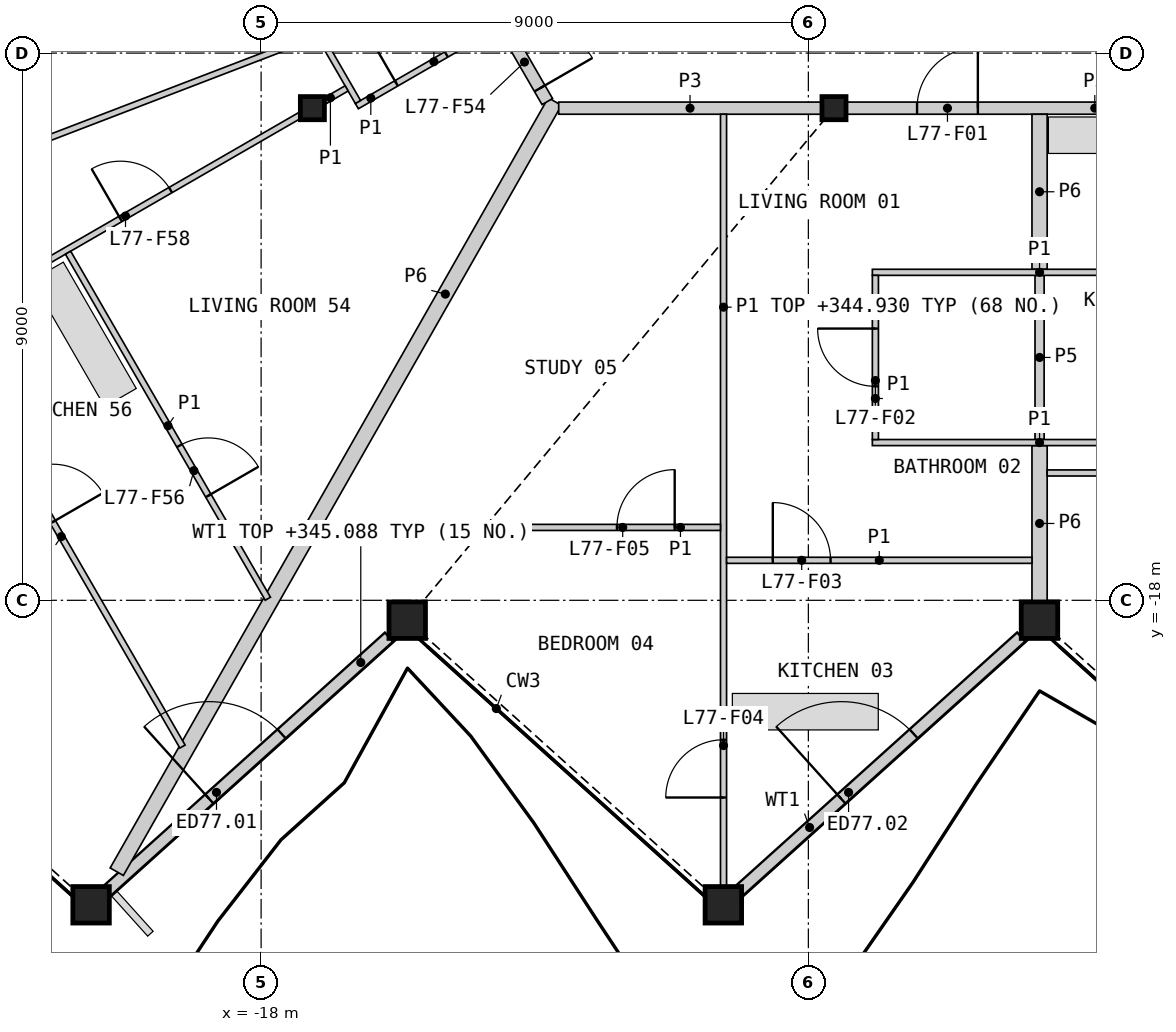
"""IFC4 building model, lengths in metres.
Left out: names, types, materials, properties, quantities, classifications, styles, units other than length and angle.
Written with IfcOpenShell. Run it as: python <this file> out.ifc"""

import sys

from ifc_helpers import new_model, si_unit, direction, frame, frame_2d, origin, origin_2d, place, context, subcontext, project, spatial, rectangle, hollow_rectangle, i_section, extrude, element, fill, save


model = new_model("IFC4")
c1 = context("Model", 3, precision=1e-05, world=origin(), true_north=direction((0.0, 1.0)))
c2 = subcontext(c1, "Body", "Model", "MODEL_VIEW")
j1 = project(units=[si_unit("LENGTHUNIT", "METRE"), si_unit("PLANEANGLEUNIT", "RADIAN")], contexts=[c1])
p1 = place(None, origin())
s1 = spatial("IfcSite", under=j1, at=p1, CompositionType="ELEMENT")
p2 = place(p1, origin())
s2 = spatial("IfcBuilding", under=s1, at=p2, CompositionType="ELEMENT")
p3 = place(p2, frame((0.0, 0.0, 342.6)))
s3 = spatial("IfcBuildingStorey", under=s2, at=p3, CompositionType="ELEMENT", Elevation=342.6)
for number, where, z_axis, x_axis in (
    (1, (-20.796, -23.008, 0.0), (0.0, 0.0, 1.0), (1.0, 0.0, 0.0)),
    (2, (-15.597, -18.327, 0.0), (0.0, 0.0, 1.0), (1.0, 0.0, 0.0)),
    (3, (-10.398, -23.008, 0.0), (0.0, 0.0, 1.0), (1.0, 0.0, 0.0)),
    (4, (-5.199, -18.327, 0.0), (0.0, 0.0, 1.0), (1.0, 0.0, 0.0)),
):
    element("IfcColumn", number, at=place(p3, frame(where, z_axis=z_axis, x_axis=x_axis)), inside=s3, PredefinedType="COLUMN", context=c2, shape_type="SweptSolid", body=[
        extrude(hollow_rectangle(XDim=0.6, YDim=0.6, WallThickness=0.04, at=origin_2d()), origin(), (0.0, 0.0, 1.0), 3.4),
    ])
for number, where, z_axis, x_axis in (
    (5, (-17.157, -9.906, 0.0), (0.0, 0.0, 1.0), (1.0, 0.0, 0.0)),
    (6, (-8.578, -9.906, 0.0), (0.0, 0.0, 1.0), (1.0, 0.0, 0.0)),
):
    element("IfcColumn", number, at=place(p3, frame(where, z_axis=z_axis, x_axis=x_axis)), inside=s3, PredefinedType="COLUMN", context=c2, shape_type="SweptSolid", body=[
        extrude(i_section(OverallWidth=0.396, OverallDepth=0.381, WebThickness=0.019, FlangeThickness=0.03, at=origin_2d()), origin(), (0.0, 0.0, 1.0), 3.4),
    ])
p4 = place(p3, frame((-20.534, -22.781, 0.0), z_axis=(0.0, 0.0, 1.0), x_axis=(0.743130709041, 0.669146283917, 0.0)))
e7 = element("IfcWall", 7, at=p4, inside=s3, PredefinedType="SOLIDWALL", context=c2, shape_type="SweptSolid", body=[
    extrude(rectangle(XDim=6.24, YDim=0.2, at=frame_2d((3.12, 0.0))), origin(), (0.0, 0.0, 1.0), 2.488),
])
p5 = place(p4, frame((2.263, 0.0, 0.0)))
e8 = element("IfcOpeningElement", 8, at=p5, cuts=e7, PredefinedType="OPENING", context=c2, shape_type="SweptSolid", body=[
    extrude(rectangle(XDim=1.6, YDim=2.25, at=frame_2d((0.8, 1.125))), frame((0.0, 0.11, 0.0), z_axis=(0.0, -1.0, 0.0), x_axis=(1.0, 0.0, 0.0)), (0.0, 0.0, 1.0), 0.22),
])
p6 = place(p3, frame((-10.139, -22.781, 0.0), z_axis=(0.0, 0.0, 1.0), x_axis=(0.743144430218, 0.669131045339, 0.0)))
e9 = element("IfcWall", 9, at=p6, inside=s3, PredefinedType="SOLIDWALL", context=c2, shape_type="SweptSolid", body=[
    extrude(rectangle(XDim=6.244, YDim=0.2, at=frame_2d((3.122, 0.0))), origin(), (0.0, 0.0, 1.0), 2.488),
])
p7 = place(p6, frame((2.263, 0.0, 0.0)))
e10 = element("IfcOpeningElement", 10, at=p7, cuts=e9, PredefinedType="OPENING", context=c2, shape_type="SweptSolid", body=[
    extrude(rectangle(XDim=1.6, YDim=2.25, at=frame_2d((0.8, 1.125))), frame((0.0, 0.11, 0.0), z_axis=(0.0, -1.0, 0.0), x_axis=(1.0, 0.0, 0.0)), (0.0, 0.0, 1.0), 0.22),
])
p8 = place(p3, frame((-20.374, -22.464, 0.0), z_axis=(0.0, 0.0, 1.0), x_axis=(0.494420378154, 0.869222922884, 0.0)))
e11 = element("IfcWall", 11, at=p8, inside=s3, PredefinedType="PARTITIONING", context=c2, shape_type="SweptSolid", body=[
    extrude(rectangle(XDim=14.573, YDim=0.25, at=frame_2d((7.286, 0.0))), origin(), (0.0, 0.0, 1.0), 2.33),
])
p9 = place(p3, frame((-8.371, -9.906, 0.0), z_axis=(0.0, 0.0, 1.0), x_axis=(1.0, 0.0, 0.0)))
e12 = element("IfcWall", 12, at=p9, inside=s3, PredefinedType="PARTITIONING", context=c2, shape_type="SweptSolid", body=[
    extrude(rectangle(XDim=8.163, YDim=0.2, at=frame_2d((4.082, 0.0))), origin(), (0.0, 0.0, 1.0), 3.1),
])
p10 = place(p9, frame((1.159, 0.0, 0.0)))
e13 = element("IfcOpeningElement", 13, at=p10, cuts=e12, PredefinedType="OPENING", context=c2, shape_type="SweptSolid", body=[
    extrude(rectangle(XDim=1.0, YDim=2.1, at=frame_2d((0.5, 1.05))), frame((0.0, 0.11, 0.0), z_axis=(0.0, -1.0, 0.0), x_axis=(1.0, 0.0, 0.0)), (0.0, 0.0, 1.0), 0.22),
])
p11 = place(p9, frame((6.327, 0.0, 0.0)))
e14 = element("IfcOpeningElement", 14, at=p11, cuts=e12, PredefinedType="OPENING", context=c2, shape_type="SweptSolid", body=[
    extrude(rectangle(XDim=1.0, YDim=2.1, at=frame_2d((0.5, 1.05))), frame((0.0, 0.11, 0.0), z_axis=(0.0, -1.0, 0.0), x_axis=(1.0, 0.0, 0.0)), (0.0, 0.0, 1.0), 0.22),
])
p12 = place(p3, frame((-13.106, -9.906, 0.0), z_axis=(0.0, 0.0, 1.0), x_axis=(1.0, 0.0, 0.0)))
e15 = element("IfcWall", 15, at=p12, inside=s3, PredefinedType="PARTITIONING", context=c2, shape_type="SweptSolid", body=[
    extrude(rectangle(XDim=4.32, YDim=0.2, at=frame_2d((2.16, 0.0))), origin(), (0.0, 0.0, 1.0), 3.1),
])
p13 = place(p3, frame((-15.131, -6.614, 0.0), z_axis=(0.0, 0.0, 1.0), x_axis=(0.499967746641, -0.866044024469, 0.0)))
e16 = element("IfcWall", 16, at=p13, inside=s3, PredefinedType="PARTITIONING", context=c2, shape_type="SweptSolid", body=[
    extrude(rectangle(XDim=3.676, YDim=0.2, at=frame_2d((1.838, 0.0))), origin(), (0.0, 0.0, 1.0), 3.1),
])
p14 = place(p13, frame((2.426, 0.0, 0.0)))
e17 = element("IfcOpeningElement", 17, at=p14, cuts=e16, PredefinedType="OPENING", context=c2, shape_type="SweptSolid", body=[
    extrude(rectangle(XDim=1.0, YDim=2.1, at=frame_2d((0.5, 1.05))), frame((0.0, 0.11, 0.0), z_axis=(0.0, -1.0, 0.0), x_axis=(1.0, 0.0, 0.0)), (0.0, 0.0, 1.0), 0.22),
])
p15 = place(p3, frame((-5.198, -12.556, 0.0), z_axis=(0.0, 0.0, 1.0), x_axis=(0.0, 1.0, 0.0)))
e18 = element("IfcWall", 18, at=p15, inside=s3, PredefinedType="PARTITIONING", context=c2, shape_type="SweptSolid", body=[
    extrude(rectangle(XDim=2.55, YDim=0.25, at=frame_2d((1.275, 0.0))), origin(), (0.0, 0.0, 1.0), 2.33),
])
p16 = place(p3, frame((-5.198, -18.017, 0.0), z_axis=(0.0, 0.0, 1.0), x_axis=(0.0, 1.0, 0.0)))
e19 = element("IfcWall", 19, at=p16, inside=s3, PredefinedType="PARTITIONING", context=c2, shape_type="SweptSolid", body=[
    extrude(rectangle(XDim=2.561, YDim=0.25, at=frame_2d((1.281, 0.0))), origin(), (0.0, 0.0, 1.0), 2.33),
])
p17 = place(p3, frame((-5.198, -15.356, 0.0), z_axis=(0.0, 0.0, 1.0), x_axis=(0.0, 1.0, 0.0)))
e20 = element("IfcWall", 20, at=p17, inside=s3, PredefinedType="PLUMBINGWALL", context=c2, shape_type="SweptSolid", body=[
    extrude(rectangle(XDim=2.7, YDim=0.15, at=frame_2d((1.35, 0.0))), origin(), (0.0, 0.0, 1.0), 2.33),
])
p18 = place(p3, frame((-10.395, -22.698, 0.0), z_axis=(0.0, 0.0, 1.0), x_axis=(0.0, 1.0, 0.0)))
e21 = element("IfcWall", 21, at=p18, inside=s3, PredefinedType="PARTITIONING", context=c2, shape_type="SweptSolid", body=[
    extrude(rectangle(XDim=12.692, YDim=0.1, at=frame_2d((6.346, 0.0))), origin(), (0.0, 0.0, 1.0), 2.33),
])
p19 = place(p18, frame((1.455, 0.0, 0.0)))
e22 = element("IfcOpeningElement", 22, at=p19, cuts=e21, PredefinedType="OPENING", context=c2, shape_type="SweptSolid", body=[
    extrude(rectangle(XDim=0.95, YDim=2.1, at=frame_2d((0.475, 1.05))), frame((0.0, 0.06, 0.0), z_axis=(0.0, -1.0, 0.0), x_axis=(1.0, 0.0, 0.0)), (0.0, 0.0, 1.0), 0.12),
])
p20 = place(p3, frame((-28.559, -13.11, 0.0), z_axis=(0.0, 0.0, 1.0), x_axis=(0.933581651686, 0.358364757802, 0.0)))
e23 = element("IfcWall", 23, at=p20, inside=s3, PredefinedType="PARTITIONING", context=c2, shape_type="SweptSolid", body=[
    extrude(rectangle(XDim=12.278, YDim=0.1, at=frame_2d((6.139, 0.0))), origin(), (0.0, 0.0, 1.0), 2.33),
])
p21 = place(p20, frame((5.564, 0.0, 0.0)))
e24 = element("IfcOpeningElement", 24, at=p21, cuts=e23, PredefinedType="OPENING", context=c2, shape_type="SweptSolid", body=[
    extrude(rectangle(XDim=0.95, YDim=2.1, at=frame_2d((0.475, 1.05))), frame((0.0, 0.06, 0.0), z_axis=(0.0, -1.0, 0.0), x_axis=(1.0, 0.0, 0.0)), (0.0, 0.0, 1.0), 0.12),
])
p22 = place(p3, frame((-27.122, -15.659, 0.0), z_axis=(0.0, 0.0, 1.0), x_axis=(0.866021046153, 0.500007547564, 0.0)))
e25 = element("IfcWall", 25, at=p22, inside=s3, PredefinedType="PARTITIONING", context=c2, shape_type="SweptSolid", body=[
    extrude(rectangle(XDim=11.267, YDim=0.1, at=frame_2d((5.634, 0.0))), origin(), (0.0, 0.0, 1.0), 2.33),
])
p23 = place(p22, frame((7.863, 0.0, 0.0)))
e26 = element("IfcOpeningElement", 26, at=p23, cuts=e25, PredefinedType="OPENING", context=c2, shape_type="SweptSolid", body=[
    extrude(rectangle(XDim=0.95, YDim=2.1, at=frame_2d((0.475, 1.05))), frame((0.0, 0.06, 0.0), z_axis=(0.0, -1.0, 0.0), x_axis=(1.0, 0.0, 0.0)), (0.0, 0.0, 1.0), 0.12),
])
p24 = place(p3, frame((-23.281, -13.499, 0.0), z_axis=(0.0, 0.0, 1.0), x_axis=(0.499994510044, -0.866028573389, 0.0)))
e27 = element("IfcWall", 27, at=p24, inside=s3, PredefinedType="PARTITIONING", context=c2, shape_type="SweptSolid", body=[
    extrude(rectangle(XDim=7.975, YDim=0.1, at=frame_2d((3.988, 0.0))), origin(), (0.0, 0.0, 1.0), 2.33),
])
p25 = place(p24, frame((2.76, 0.0, 0.0)))
e28 = element("IfcOpeningElement", 28, at=p25, cuts=e27, PredefinedType="OPENING", context=c2, shape_type="SweptSolid", body=[
    extrude(rectangle(XDim=0.95, YDim=2.1, at=frame_2d((0.475, 1.05))), frame((0.0, 0.06, 0.0), z_axis=(0.0, -1.0, 0.0), x_axis=(1.0, 0.0, 0.0)), (0.0, 0.0, 1.0), 0.12),
])
p26 = place(p3, frame((-17.028, -16.801, 0.0), z_axis=(0.0, 0.0, 1.0), x_axis=(1.0, 0.0, 0.0)))
e29 = element("IfcWall", 29, at=p26, inside=s3, PredefinedType="PARTITIONING", context=c2, shape_type="SweptSolid", body=[
    extrude(rectangle(XDim=6.583, YDim=0.1, at=frame_2d((3.292, 0.0))), origin(), (0.0, 0.0, 1.0), 2.33),
])
p27 = place(p26, frame((4.88, 0.0, 0.0)))
e30 = element("IfcOpeningElement", 30, at=p27, cuts=e29, PredefinedType="OPENING", context=c2, shape_type="SweptSolid", body=[
    extrude(rectangle(XDim=0.95, YDim=2.1, at=frame_2d((0.475, 1.05))), frame((0.0, 0.06, 0.0), z_axis=(0.0, -1.0, 0.0), x_axis=(1.0, 0.0, 0.0)), (0.0, 0.0, 1.0), 0.12),
])
p28 = place(p3, frame((-21.175, -12.283, 0.0), z_axis=(0.0, 0.0, 1.0), x_axis=(0.49999903102, -0.866025963225, 0.0)))
e31 = element("IfcWall", 31, at=p28, inside=s3, PredefinedType="PARTITIONING", context=c2, shape_type="SweptSolid", body=[
    extrude(rectangle(XDim=6.571, YDim=0.1, at=frame_2d((3.286, 0.0))), origin(), (0.0, 0.0, 1.0), 2.33),
])
p29 = place(p28, frame((3.664, 0.0, 0.0)))
e32 = element("IfcOpeningElement", 32, at=p29, cuts=e31, PredefinedType="OPENING", context=c2, shape_type="SweptSolid", body=[
    extrude(rectangle(XDim=0.95, YDim=2.1, at=frame_2d((0.475, 1.05))), frame((0.0, 0.06, 0.0), z_axis=(0.0, -1.0, 0.0), x_axis=(1.0, 0.0, 0.0)), (0.0, 0.0, 1.0), 0.12),
])
p30 = place(p3, frame((-7.948, -12.606, 0.0), z_axis=(0.0, 0.0, 1.0), x_axis=(1.0, 0.0, 0.0)))
e33 = element("IfcWall", 33, at=p30, inside=s3, PredefinedType="PARTITIONING", context=c2, shape_type="SweptSolid", body=[
    extrude(rectangle(XDim=5.5, YDim=0.1, at=frame_2d((2.75, 0.0))), origin(), (0.0, 0.0, 1.0), 2.33),
])
p31 = place(p3, frame((-7.948, -15.406, 0.0), z_axis=(0.0, 0.0, 1.0), x_axis=(1.0, 0.0, 0.0)))
e34 = element("IfcWall", 34, at=p31, inside=s3, PredefinedType="PARTITIONING", context=c2, shape_type="SweptSolid", body=[
    extrude(rectangle(XDim=5.5, YDim=0.1, at=frame_2d((2.75, 0.0))), origin(), (0.0, 0.0, 1.0), 2.33),
])
p32 = place(p31, frame((4.3, 0.0, 0.0)))
e35 = element("IfcOpeningElement", 35, at=p32, cuts=e34, PredefinedType="OPENING", context=c2, shape_type="SweptSolid", body=[
    extrude(rectangle(XDim=0.95, YDim=2.1, at=frame_2d((0.475, 1.05))), frame((0.0, 0.06, 0.0), z_axis=(0.0, -1.0, 0.0), x_axis=(1.0, 0.0, 0.0)), (0.0, 0.0, 1.0), 0.12),
])
p33 = place(p3, frame((-10.345, -17.342, 0.0), z_axis=(0.0, 0.0, 1.0), x_axis=(1.0, 0.0, 0.0)))
e36 = element("IfcWall", 36, at=p33, inside=s3, PredefinedType="PARTITIONING", context=c2, shape_type="SweptSolid", body=[
    extrude(rectangle(XDim=5.023, YDim=0.1, at=frame_2d((2.511, 0.0))), origin(), (0.0, 0.0, 1.0), 2.33),
])
p34 = place(p33, frame((0.76, 0.0, 0.0)))
e37 = element("IfcOpeningElement", 37, at=p34, cuts=e36, PredefinedType="OPENING", context=c2, shape_type="SweptSolid", body=[
    extrude(rectangle(XDim=0.95, YDim=2.1, at=frame_2d((0.475, 1.05))), frame((0.0, 0.06, 0.0), z_axis=(0.0, -1.0, 0.0), x_axis=(1.0, 0.0, 0.0)), (0.0, 0.0, 1.0), 0.12),
])
p35 = place(p3, frame((-5.073, -15.906, 0.0), z_axis=(0.0, 0.0, 1.0), x_axis=(1.0, 0.0, 0.0)))
e38 = element("IfcWall", 38, at=p35, inside=s3, PredefinedType="PARTITIONING", context=c2, shape_type="SweptSolid", body=[
    extrude(rectangle(XDim=2.825, YDim=0.1, at=frame_2d((1.413, 0.0))), origin(), (0.0, 0.0, 1.0), 2.33),
])
p36 = place(p3, frame((-7.897, -15.356, 0.0), z_axis=(0.0, 0.0, 1.0), x_axis=(0.0, 1.0, 0.0)))
e39 = element("IfcWall", 39, at=p36, inside=s3, PredefinedType="PARTITIONING", context=c2, shape_type="SweptSolid", body=[
    extrude(rectangle(XDim=2.7, YDim=0.1, at=frame_2d((1.35, 0.0))), origin(), (0.0, 0.0, 1.0), 2.33),
])
p37 = place(p36, frame((0.875, 0.0, 0.0)))
e40 = element("IfcOpeningElement", 40, at=p37, cuts=e39, PredefinedType="OPENING", context=c2, shape_type="SweptSolid", body=[
    extrude(rectangle(XDim=0.95, YDim=2.1, at=frame_2d((0.475, 1.05))), frame((0.0, 0.06, 0.0), z_axis=(0.0, -1.0, 0.0), x_axis=(1.0, 0.0, 0.0)), (0.0, 0.0, 1.0), 0.12),
])
p38 = place(p3, frame((-16.426, -9.872, 0.0), z_axis=(0.0, 0.0, 1.0), x_axis=(0.866029095148, 0.499993606316, 0.0)))
e41 = element("IfcWall", 41, at=p38, inside=s3, PredefinedType="PARTITIONING", context=c2, shape_type="SweptSolid", body=[
    extrude(rectangle(XDim=2.65, YDim=0.1, at=frame_2d((1.325, 0.0))), origin(), (0.0, 0.0, 1.0), 2.33),
])
p39 = place(p38, frame((0.75, 0.0, 0.0)))
e42 = element("IfcOpeningElement", 42, at=p39, cuts=e41, PredefinedType="OPENING", context=c2, shape_type="SweptSolid", body=[
    extrude(rectangle(XDim=0.95, YDim=2.1, at=frame_2d((0.475, 1.05))), frame((0.0, 0.06, 0.0), z_axis=(0.0, -1.0, 0.0), x_axis=(1.0, 0.0, 0.0)), (0.0, 0.0, 1.0), 0.12),
])
p40 = place(p3, frame((-17.507, -7.899, 0.0), z_axis=(0.0, 0.0, 1.0), x_axis=(0.499946605688, -0.86605622881, 0.0)))
e43 = element("IfcWall", 43, at=p40, inside=s3, PredefinedType="PARTITIONING", context=c2, shape_type="SweptSolid", body=[
    extrude(rectangle(XDim=2.2, YDim=0.1, at=frame_2d((1.1, 0.0))), origin(), (0.0, 0.0, 1.0), 2.33),
])
p41 = place(p3, frame((-16.949, -9.786, 0.0), z_axis=(0.0, 0.0, 1.0), x_axis=(0.866036909293, 0.499980071345, 0.0)))
e44 = element("IfcWall", 44, at=p41, inside=s3, PredefinedType="PARTITIONING", context=c2, shape_type="SweptSolid", body=[
    extrude(rectangle(XDim=0.41, YDim=0.1, at=frame_2d((0.205, 0.0))), origin(), (0.0, 0.0, 1.0), 2.33),
])
p42 = place(p5, origin())
e45 = element("IfcDoor", 45, at=p42, inside=s3, OperationType="DOUBLE_DOOR_SINGLE_SWING", PredefinedType="DOOR", context=c2, shape_type="SweptSolid", body=[
    extrude(rectangle(XDim=1.6, YDim=2.25, at=frame_2d((0.8, 1.125))), frame((0.0, 0.025, 0.0), z_axis=(0.0, -1.0, 0.0), x_axis=(1.0, 0.0, 0.0)), (0.0, 0.0, 1.0), 0.05),
])
fill(e8, e45)
p43 = place(p7, origin())
e46 = element("IfcDoor", 46, at=p43, inside=s3, OperationType="DOUBLE_DOOR_SINGLE_SWING", PredefinedType="DOOR", context=c2, shape_type="SweptSolid", body=[
    extrude(rectangle(XDim=1.6, YDim=2.25, at=frame_2d((0.8, 1.125))), frame((0.0, 0.025, 0.0), z_axis=(0.0, -1.0, 0.0), x_axis=(1.0, 0.0, 0.0)), (0.0, 0.0, 1.0), 0.05),
])
fill(e10, e46)
p44 = place(p10, origin())
e47 = element("IfcDoor", 47, at=p44, inside=s3, OperationType="SINGLE_SWING_RIGHT", PredefinedType="DOOR", context=c2, shape_type="SweptSolid", body=[
    extrude(rectangle(XDim=1.0, YDim=2.1, at=frame_2d((0.5, 1.05))), frame((0.0, 0.025, 0.0), z_axis=(0.0, -1.0, 0.0), x_axis=(1.0, 0.0, 0.0)), (0.0, 0.0, 1.0), 0.05),
])
fill(e13, e47)
p45 = place(p37, origin())
e48 = element("IfcDoor", 48, at=p45, inside=s3, OperationType="SINGLE_SWING_RIGHT", PredefinedType="DOOR", context=c2, shape_type="SweptSolid", body=[
    extrude(rectangle(XDim=0.95, YDim=2.1, at=frame_2d((0.475, 1.05))), frame((0.0, 0.025, 0.0), z_axis=(0.0, -1.0, 0.0), x_axis=(1.0, 0.0, 0.0)), (0.0, 0.0, 1.0), 0.05),
])
fill(e40, e48)
p46 = place(p34, origin())
e49 = element("IfcDoor", 49, at=p46, inside=s3, OperationType="SINGLE_SWING_LEFT", PredefinedType="DOOR", context=c2, shape_type="SweptSolid", body=[
    extrude(rectangle(XDim=0.95, YDim=2.1, at=frame_2d((0.475, 1.05))), frame((0.0, 0.025, 0.0), z_axis=(0.0, -1.0, 0.0), x_axis=(1.0, 0.0, 0.0)), (0.0, 0.0, 1.0), 0.05),
])
fill(e37, e49)
p47 = place(p19, origin())
e50 = element("IfcDoor", 50, at=p47, inside=s3, OperationType="SINGLE_SWING_LEFT", PredefinedType="DOOR", context=c2, shape_type="SweptSolid", body=[
    extrude(rectangle(XDim=0.95, YDim=2.1, at=frame_2d((0.475, 1.05))), frame((0.0, 0.025, 0.0), z_axis=(0.0, -1.0, 0.0), x_axis=(1.0, 0.0, 0.0)), (0.0, 0.0, 1.0), 0.05),
])
fill(e22, e50)
p48 = place(p27, origin())
e51 = element("IfcDoor", 51, at=p48, inside=s3, OperationType="SINGLE_SWING_RIGHT", PredefinedType="DOOR", context=c2, shape_type="SweptSolid", body=[
    extrude(rectangle(XDim=0.95, YDim=2.1, at=frame_2d((0.475, 1.05))), frame((0.0, 0.025, 0.0), z_axis=(0.0, -1.0, 0.0), x_axis=(1.0, 0.0, 0.0)), (0.0, 0.0, 1.0), 0.05),
])
fill(e30, e51)
p49 = place(p14, origin())
e52 = element("IfcDoor", 52, at=p49, inside=s3, OperationType="SINGLE_SWING_RIGHT", PredefinedType="DOOR", context=c2, shape_type="SweptSolid", body=[
    extrude(rectangle(XDim=1.0, YDim=2.1, at=frame_2d((0.5, 1.05))), frame((0.0, 0.025, 0.0), z_axis=(0.0, -1.0, 0.0), x_axis=(1.0, 0.0, 0.0)), (0.0, 0.0, 1.0), 0.05),
])
fill(e17, e52)
p50 = place(p39, origin())
e53 = element("IfcDoor", 53, at=p50, inside=s3, OperationType="SINGLE_SWING_LEFT", PredefinedType="DOOR", context=c2, shape_type="SweptSolid", body=[
    extrude(rectangle(XDim=0.95, YDim=2.1, at=frame_2d((0.475, 1.05))), frame((0.0, 0.025, 0.0), z_axis=(0.0, -1.0, 0.0), x_axis=(1.0, 0.0, 0.0)), (0.0, 0.0, 1.0), 0.05),
])
fill(e42, e53)
p51 = place(p29, origin())
e54 = element("IfcDoor", 54, at=p51, inside=s3, OperationType="SINGLE_SWING_RIGHT", PredefinedType="DOOR", context=c2, shape_type="SweptSolid", body=[
    extrude(rectangle(XDim=0.95, YDim=2.1, at=frame_2d((0.475, 1.05))), frame((0.0, 0.025, 0.0), z_axis=(0.0, -1.0, 0.0), x_axis=(1.0, 0.0, 0.0)), (0.0, 0.0, 1.0), 0.05),
])
fill(e32, e54)
p52 = place(p25, origin())
e55 = element("IfcDoor", 55, at=p52, inside=s3, OperationType="SINGLE_SWING_RIGHT", PredefinedType="DOOR", context=c2, shape_type="SweptSolid", body=[
    extrude(rectangle(XDim=0.95, YDim=2.1, at=frame_2d((0.475, 1.05))), frame((0.0, 0.025, 0.0), z_axis=(0.0, -1.0, 0.0), x_axis=(1.0, 0.0, 0.0)), (0.0, 0.0, 1.0), 0.05),
])
fill(e28, e55)
p53 = place(p23, origin())
e56 = element("IfcDoor", 56, at=p53, inside=s3, OperationType="SINGLE_SWING_LEFT", PredefinedType="DOOR", context=c2, shape_type="SweptSolid", body=[
    extrude(rectangle(XDim=0.95, YDim=2.1, at=frame_2d((0.475, 1.05))), frame((0.0, 0.025, 0.0), z_axis=(0.0, -1.0, 0.0), x_axis=(1.0, 0.0, 0.0)), (0.0, 0.0, 1.0), 0.05),
])
fill(e26, e56)
save(model, sys.argv[1])
